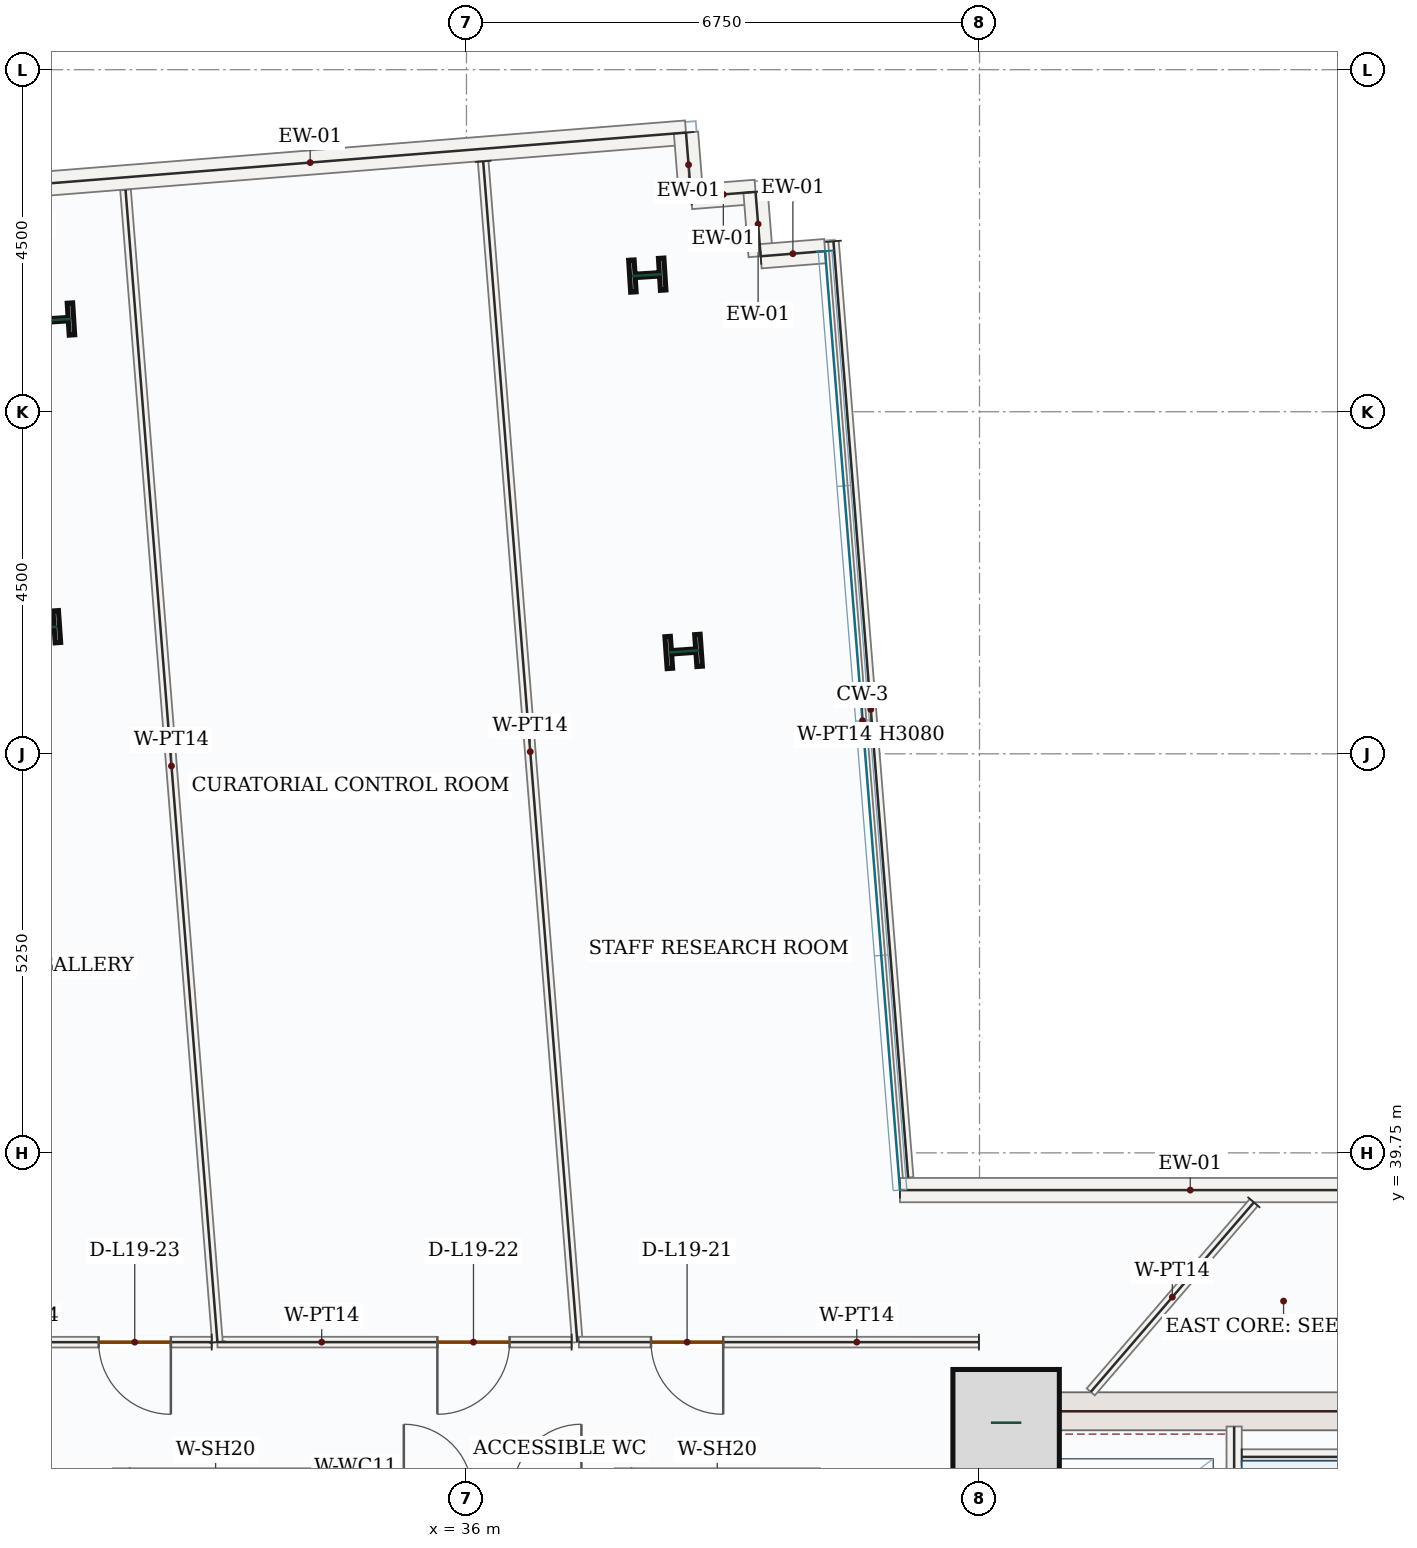
"""IFC4 building model, lengths in metres.
Left out: names, types, materials, properties, quantities, classifications, styles, units other than length and angle.
Written with IfcOpenShell. Run it as: python <this file> out.ifc"""

import sys

from ifc_helpers import new_model, si_unit, direction, frame, frame_2d, origin, origin_2d, place, context, subcontext, project, spatial, rectangle, i_section, extrude, source, transform, mapped, element, fill, save


model = new_model("IFC4")
c1 = context("Model", 3, precision=1e-05, world=origin(), true_north=direction((0.0, 1.0)))
c2 = subcontext(c1, "Body", "Model", "MODEL_VIEW")
j1 = project(units=[si_unit("LENGTHUNIT", "METRE"), si_unit("PLANEANGLEUNIT", "RADIAN")], contexts=[c1])
p1 = place(None, origin())
s1 = spatial("IfcSite", under=j1, at=p1, CompositionType="ELEMENT")
p2 = place(p1, origin())
s2 = spatial("IfcBuilding", under=s1, at=p2, CompositionType="ELEMENT")
p3 = place(p2, frame((0.0, 0.0, 87.9)))
s3 = spatial("IfcBuildingStorey", under=s2, at=p3, CompositionType="ELEMENT", Elevation=87.9)
p4 = place(p3, frame((43.0, 28.05, 0.0), z_axis=(0.0, 0.0, 1.0), x_axis=(0.0, 1.0, 0.0)))
e1 = element("IfcWall", 1, at=p4, inside=s3, PredefinedType="SHEAR", context=c2, shape_type="SweptSolid", body=[
    extrude(rectangle(XDim=8.55, YDim=0.5, at=frame_2d((4.275, 0.0))), origin(), (0.0, 0.0, 1.0), 3.95),
])
p5 = place(p4, frame((1.5, 0.0, 0.0)))
e2 = element("IfcOpeningElement", 2, at=p5, cuts=e1, PredefinedType="OPENING", context=c2, shape_type="SweptSolid", body=[
    extrude(rectangle(XDim=1.1, YDim=2.2, at=frame_2d((0.55, 1.1))), frame((0.0, 0.26, 0.0), z_axis=(0.0, -1.0, 0.0), x_axis=(1.0, 0.0, 0.0)), (0.0, 0.0, 1.0), 0.52),
])
m1 = source(origin(), c2, "Body", "SweptSolid", [
    extrude(rectangle(XDim=7.0, YDim=0.5, at=frame_2d((3.5, 0.0))), origin(), (0.0, 0.0, 1.0), 3.95),
])
p6 = place(p3, frame((43.25, 36.35, 0.0), z_axis=(0.0, 0.0, 1.0), x_axis=(1.0, 0.0, 0.0)))
e3 = element("IfcWall", 3, at=p6, inside=s3, PredefinedType="SHEAR", context=c2, shape_type="MappedRepresentation", body=[
    mapped(m1, transform((0.0, 0.0, 0.0), x_axis=(1.0, 0.0, 0.0), y_axis=(0.0, 1.0, 0.0), z_axis=(0.0, 0.0, 1.0), scale=1.0)),
])
m2 = source(origin(), c2, "Body", "SweptSolid", [
    extrude(rectangle(XDim=1.4, YDim=1.4, at=origin_2d()), origin(), (0.0, 0.0, 1.0), 4.2),
])
p7 = place(p3, frame((43.1, 36.2, 0.0), z_axis=(0.0, 0.0, 1.0), x_axis=(1.0, 0.0, 0.0)))
e4 = element("IfcColumn", 4, at=p7, inside=s3, PredefinedType="COLUMN", context=c2, shape_type="MappedRepresentation", body=[
    mapped(m2, transform((0.0, 0.0, 0.0), x_axis=(1.0, 0.0, 0.0), y_axis=(0.0, 1.0, 0.0), z_axis=(0.0, 0.0, 1.0), scale=1.0)),
])
m3 = source(origin(), c2, "Body", "SweptSolid", [
    extrude(i_section(OverallWidth=0.421, OverallDepth=0.465, WebThickness=0.045, FlangeThickness=0.073, FilletRadius=0.018, at=origin_2d()), origin(), (0.0, 0.0, 1.0), 4.2),
])
for number, where, z_axis, x_axis in (
    (5, (38.857, 46.346, 0.0), (0.0, 0.0, 1.0), (-0.07, 0.998, 0.0)),
    (6, (30.415, 46.658, 0.0), (0.0, 0.0, 1.0), (-0.07, 0.998, 0.0)),
    (7, (38.379, 51.297, 0.0), (0.0, 0.0, 1.0), (-0.063, 0.998, 0.0)),
    (8, (30.601, 50.708, 0.0), (0.0, 0.0, 1.0), (-0.063, 0.998, 0.0)),
):
    element("IfcColumn", number, at=place(p3, frame(where, z_axis=z_axis, x_axis=x_axis)), inside=s3, PredefinedType="COLUMN", context=c2, shape_type="MappedRepresentation", body=[
        mapped(m3, transform((0.0, 0.0, 0.0), x_axis=(1.0, 0.0, 0.0), y_axis=(0.0, 1.0, 0.0), z_axis=(0.0, 0.0, 1.0), scale=1.0)),
    ])
m4 = source(origin(), c2, "Body", "SweptSolid", [
    extrude(rectangle(XDim=9.92, YDim=0.32, at=frame_2d((4.96, 0.0))), origin(), (0.0, 0.0, 1.0), 3.95),
])
p8 = place(p3, frame((29.0, 52.384, 0.0), z_axis=(0.0, 0.0, 1.0), x_axis=(0.996833485558, 0.079517306731, 0.0)))
e9 = element("IfcWall", 9, at=p8, inside=s3, PredefinedType="SOLIDWALL", context=c2, shape_type="MappedRepresentation", body=[
    mapped(m4, transform((0.0, 0.0, 0.0), x_axis=(1.0, 0.0, 0.0), y_axis=(0.0, 1.0, 0.0), z_axis=(0.0, 0.0, 1.0), scale=1.0)),
])
m5 = source(origin(), c2, "Body", "SweptSolid", [
    extrude(rectangle(XDim=0.85, YDim=0.32, at=frame_2d((0.425, 0.0))), origin(), (0.0, 0.0, 1.0), 3.95),
])
p9 = place(p3, frame((38.888, 53.173, 0.0), z_axis=(0.0, 0.0, 1.0), x_axis=(0.079551174585, -0.996830783344, 0.0)))
e10 = element("IfcWall", 10, at=p9, inside=s3, PredefinedType="SOLIDWALL", context=c2, shape_type="MappedRepresentation", body=[
    mapped(m5, transform((0.0, 0.0, 0.0), x_axis=(1.0, 0.0, 0.0), y_axis=(0.0, 1.0, 0.0), z_axis=(0.0, 0.0, 1.0), scale=1.0)),
])
m6 = source(origin(), c2, "Body", "SweptSolid", [
    extrude(rectangle(XDim=0.85, YDim=0.32, at=frame_2d((0.425, 0.0))), origin(), (0.0, 0.0, 1.0), 3.95),
])
for number, where, z_axis, x_axis in (
    (11, (38.956, 52.325, 0.0), (0.0, 0.0, 1.0), (0.997, 0.079, 0.0)),
    (12, (39.803, 52.393, 0.0), (0.0, 0.0, 1.0), (0.08, -0.997, 0.0)),
):
    element("IfcWall", number, at=place(p3, frame(where, z_axis=z_axis, x_axis=x_axis)), inside=s3, PredefinedType="SOLIDWALL", context=c2, shape_type="MappedRepresentation", body=[
        mapped(m6, transform((0.0, 0.0, 0.0), x_axis=(1.0, 0.0, 0.0), y_axis=(0.0, 1.0, 0.0), z_axis=(0.0, 0.0, 1.0), scale=1.0)),
    ])
p10 = place(p3, frame((39.871, 51.545, 0.0), z_axis=(0.0, 0.0, 1.0), x_axis=(0.996830783344, 0.079551174585, 0.0)))
e13 = element("IfcWall", 13, at=p10, inside=s3, PredefinedType="SOLIDWALL", context=c2, shape_type="MappedRepresentation", body=[
    mapped(m5, transform((0.0, 0.0, 0.0), x_axis=(1.0, 0.0, 0.0), y_axis=(0.0, 1.0, 0.0), z_axis=(0.0, 0.0, 1.0), scale=1.0)),
])
m7 = source(origin(), c2, "Body", "SweptSolid", [
    extrude(rectangle(XDim=7.639, YDim=0.32, at=frame_2d((3.819, 0.0))), origin(), (0.0, 0.0, 1.0), 3.95),
])
p11 = place(p3, frame((41.703, 39.26, 0.0), z_axis=(0.0, 0.0, 1.0), x_axis=(1.0, 0.0, 0.0)))
e14 = element("IfcWall", 14, at=p11, inside=s3, PredefinedType="SOLIDWALL", context=c2, shape_type="MappedRepresentation", body=[
    mapped(m7, transform((0.0, 0.0, 0.0), x_axis=(1.0, 0.0, 0.0), y_axis=(0.0, 1.0, 0.0), z_axis=(0.0, 0.0, 1.0), scale=1.0)),
])
p12 = place(p3, frame((46.1, 28.15, 0.0), z_axis=(0.0, 0.0, 1.0), x_axis=(0.0, 1.0, 0.0)))
e15 = element("IfcWall", 15, at=p12, inside=s3, PredefinedType="SOLIDWALL", context=c2, shape_type="SweptSolid", body=[
    extrude(rectangle(XDim=8.0, YDim=0.2, at=frame_2d((4.0, 0.0))), origin(), (0.0, 0.0, 1.0), 3.95),
])
p13 = place(p12, frame((0.4, 0.0, 0.0)))
e16 = element("IfcOpeningElement", 16, at=p13, cuts=e15, PredefinedType="OPENING", context=c2, shape_type="SweptSolid", body=[
    extrude(rectangle(XDim=1.05, YDim=2.15, at=frame_2d((0.525, 1.075))), frame((0.0, 0.11, 0.0), z_axis=(0.0, -1.0, 0.0), x_axis=(1.0, 0.0, 0.0)), (0.0, 0.0, 1.0), 0.22),
])
m8 = source(origin(), c2, "Body", "SweptSolid", [
    extrude(rectangle(XDim=3.25, YDim=0.2, at=frame_2d((1.625, 0.0))), origin(), (0.0, 0.0, 1.0), 3.95),
])
p14 = place(p3, frame((46.2, 35.75, 0.0), z_axis=(0.0, 0.0, 1.0), x_axis=(1.0, 0.0, 0.0)))
e17 = element("IfcWall", 17, at=p14, inside=s3, PredefinedType="SOLIDWALL", context=c2, shape_type="MappedRepresentation", body=[
    mapped(m8, transform((0.0, 0.0, 0.0), x_axis=(1.0, 0.0, 0.0), y_axis=(0.0, 1.0, 0.0), z_axis=(0.0, 0.0, 1.0), scale=1.0)),
])
m9 = source(origin(), c2, "Body", "SweptSolid", [
    extrude(rectangle(XDim=2.4, YDim=0.2, at=frame_2d((1.2, 0.0))), origin(), (0.0, 0.0, 1.0), 3.95),
])
for number, where, z_axis, x_axis in (
    (18, (31.45, 33.2, 0.0), (0.0, 0.0, 1.0), (0.0, 1.0, 0.0)),
    (19, (33.95, 33.2, 0.0), (0.0, 0.0, 1.0), (0.0, 1.0, 0.0)),
    (20, (38.05, 33.2, 0.0), (0.0, 0.0, 1.0), (0.0, 1.0, 0.0)),
    (21, (40.55, 33.2, 0.0), (0.0, 0.0, 1.0), (0.0, 1.0, 0.0)),
):
    element("IfcWall", number, at=place(p3, frame(where, z_axis=z_axis, x_axis=x_axis)), inside=s3, PredefinedType="SOLIDWALL", context=c2, shape_type="MappedRepresentation", body=[
        mapped(m9, transform((0.0, 0.0, 0.0), x_axis=(1.0, 0.0, 0.0), y_axis=(0.0, 1.0, 0.0), z_axis=(0.0, 0.0, 1.0), scale=1.0)),
    ])
m10 = source(origin(), c2, "Body", "SweptSolid", [
    extrude(rectangle(XDim=15.583, YDim=0.14, at=frame_2d((7.792, 0.0))), origin(), (0.0, 0.0, 1.0), 3.95),
])
p15 = place(p3, frame((36.22, 52.794, 0.0), z_axis=(0.0, 0.0, 1.0), x_axis=(0.079507979427, -0.996834229552, 0.0)))
e22 = element("IfcWall", 22, at=p15, inside=s3, PredefinedType="PARTITIONING", context=c2, shape_type="MappedRepresentation", body=[
    mapped(m10, transform((0.0, 0.0, 0.0), x_axis=(1.0, 0.0, 0.0), y_axis=(0.0, 1.0, 0.0), z_axis=(0.0, 0.0, 1.0), scale=1.0)),
])
p16 = place(p3, frame((37.384, 37.26, 0.0), z_axis=(0.0, 0.0, 1.0), x_axis=(-1.0, 0.0, 0.0)))
e23 = element("IfcWall", 23, at=p16, inside=s3, PredefinedType="PARTITIONING", context=c2, shape_type="SweptSolid", body=[
    extrude(rectangle(XDim=4.66, YDim=0.14, at=frame_2d((2.33, 0.0))), origin(), (0.0, 0.0, 1.0), 3.95),
])
p17 = place(p16, frame((0.816, 0.0, 0.0)))
e24 = element("IfcOpeningElement", 24, at=p17, cuts=e23, PredefinedType="OPENING", context=c2, shape_type="SweptSolid", body=[
    extrude(rectangle(XDim=0.95, YDim=2.15, at=frame_2d((0.475, 1.075))), frame((0.0, 0.08, 0.0), z_axis=(0.0, -1.0, 0.0), x_axis=(1.0, 0.0, 0.0)), (0.0, 0.0, 1.0), 0.16),
])
m11 = source(origin(), c2, "Body", "SweptSolid", [
    extrude(rectangle(XDim=15.207, YDim=0.14, at=frame_2d((7.604, 0.0))), origin(), (0.0, 0.0, 1.0), 3.95),
])
p18 = place(p3, frame((32.724, 37.26, 0.0), z_axis=(0.0, 0.0, 1.0), x_axis=(-0.07950146843, 0.996834748851, 0.0)))
e25 = element("IfcWall", 25, at=p18, inside=s3, PredefinedType="PARTITIONING", context=c2, shape_type="MappedRepresentation", body=[
    mapped(m11, transform((0.0, 0.0, 0.0), x_axis=(1.0, 0.0, 0.0), y_axis=(0.0, 1.0, 0.0), z_axis=(0.0, 0.0, 1.0), scale=1.0)),
])
p19 = place(p3, frame((32.649, 37.26, 0.0), z_axis=(0.0, 0.0, 1.0), x_axis=(-0.999999935313, -0.00035968633, 0.0)))
e26 = element("IfcWall", 26, at=p19, inside=s3, PredefinedType="PARTITIONING", context=c2, shape_type="SweptSolid", body=[
    extrude(rectangle(XDim=3.394, YDim=0.14, at=frame_2d((1.697, 0.0))), origin(), (0.0, 0.0, 1.0), 3.95),
])
p20 = place(p19, frame((0.538, 0.0, 0.0)))
e27 = element("IfcOpeningElement", 27, at=p20, cuts=e26, PredefinedType="OPENING", context=c2, shape_type="SweptSolid", body=[
    extrude(rectangle(XDim=0.95, YDim=2.15, at=frame_2d((0.475, 1.075))), frame((0.0, 0.08, 0.0), z_axis=(0.0, -1.0, 0.0), x_axis=(1.0, 0.0, 0.0)), (0.0, 0.0, 1.0), 0.16),
])
p21 = place(p3, frame((42.742, 37.26, 0.0), z_axis=(0.0, 0.0, 1.0), x_axis=(-0.999999998924, 4.6384341e-05, 0.0)))
e28 = element("IfcWall", 28, at=p21, inside=s3, PredefinedType="PARTITIONING", context=c2, shape_type="SweptSolid", body=[
    extrude(rectangle(XDim=5.263, YDim=0.14, at=frame_2d((2.632, 0.0))), origin(), (0.0, 0.0, 1.0), 3.95),
])
p22 = place(p21, frame((3.365, 0.0, 0.0)))
e29 = element("IfcOpeningElement", 29, at=p22, cuts=e28, PredefinedType="OPENING", context=c2, shape_type="SweptSolid", body=[
    extrude(rectangle(XDim=0.95, YDim=2.15, at=frame_2d((0.475, 1.075))), frame((0.0, 0.08, 0.0), z_axis=(0.0, -1.0, 0.0), x_axis=(1.0, 0.0, 0.0)), (0.0, 0.0, 1.0), 0.16),
])
m12 = source(origin(), c2, "Body", "SweptSolid", [
    extrude(rectangle(XDim=12.356, YDim=0.14, at=frame_2d((6.178, 0.0))), origin(), (0.0, 0.0, 1.0), 3.08),
])
p23 = place(p3, frame((40.828, 51.742, 0.0), z_axis=(0.0, 0.0, 1.0), x_axis=(0.079527689156, -0.996832657299, 0.0)))
e30 = element("IfcWall", 30, at=p23, inside=s3, PredefinedType="PARTITIONING", context=c2, shape_type="MappedRepresentation", body=[
    mapped(m12, transform((0.0, 0.0, 0.0), x_axis=(1.0, 0.0, 0.0), y_axis=(0.0, 1.0, 0.0), z_axis=(0.0, 0.0, 1.0), scale=1.0)),
])
m13 = source(origin(), c2, "Body", "SweptSolid", [
    extrude(rectangle(XDim=3.29, YDim=0.14, at=frame_2d((1.645, 0.0))), origin(), (0.0, 0.0, 1.0), 3.95),
])
p24 = place(p3, frame((46.36, 39.099, 0.0), z_axis=(0.0, 0.0, 1.0), x_axis=(-0.652214149627, -0.758034763732, 0.0)))
e31 = element("IfcWall", 31, at=p24, inside=s3, PredefinedType="PARTITIONING", context=c2, shape_type="MappedRepresentation", body=[
    mapped(m13, transform((0.0, 0.0, 0.0), x_axis=(1.0, 0.0, 0.0), y_axis=(0.0, 1.0, 0.0), z_axis=(0.0, 0.0, 1.0), scale=1.0)),
])
m14 = source(origin(), c2, "Body", "SweptSolid", [
    extrude(rectangle(XDim=0.95, YDim=2.15, at=frame_2d((0.475, 1.075))), frame((0.0, 0.025, 0.0), z_axis=(0.0, -1.0, 0.0), x_axis=(1.0, 0.0, 0.0)), (0.0, 0.0, 1.0), 0.05),
])
p25 = place(p22, origin())
e32 = element("IfcDoor", 32, at=p25, inside=s3, OperationType="SINGLE_SWING_LEFT", PredefinedType="DOOR", context=c2, shape_type="MappedRepresentation", body=[
    mapped(m14, transform((0.0, 0.0, 0.0), x_axis=(1.0, 0.0, 0.0), y_axis=(0.0, 1.0, 0.0), z_axis=(0.0, 0.0, 1.0), scale=1.0)),
])
fill(e29, e32)
p26 = place(p17, origin())
e33 = element("IfcDoor", 33, at=p26, inside=s3, OperationType="SINGLE_SWING_RIGHT", PredefinedType="DOOR", context=c2, shape_type="MappedRepresentation", body=[
    mapped(m14, transform((0.0, 0.0, 0.0), x_axis=(1.0, 0.0, 0.0), y_axis=(0.0, 1.0, 0.0), z_axis=(0.0, 0.0, 1.0), scale=1.0)),
])
fill(e24, e33)
p27 = place(p20, origin())
e34 = element("IfcDoor", 34, at=p27, inside=s3, OperationType="SINGLE_SWING_LEFT", PredefinedType="DOOR", context=c2, shape_type="MappedRepresentation", body=[
    mapped(m14, transform((0.0, 0.0, 0.0), x_axis=(1.0, 0.0, 0.0), y_axis=(0.0, 1.0, 0.0), z_axis=(0.0, 0.0, 1.0), scale=1.0)),
])
fill(e27, e34)
save(model, sys.argv[1])
